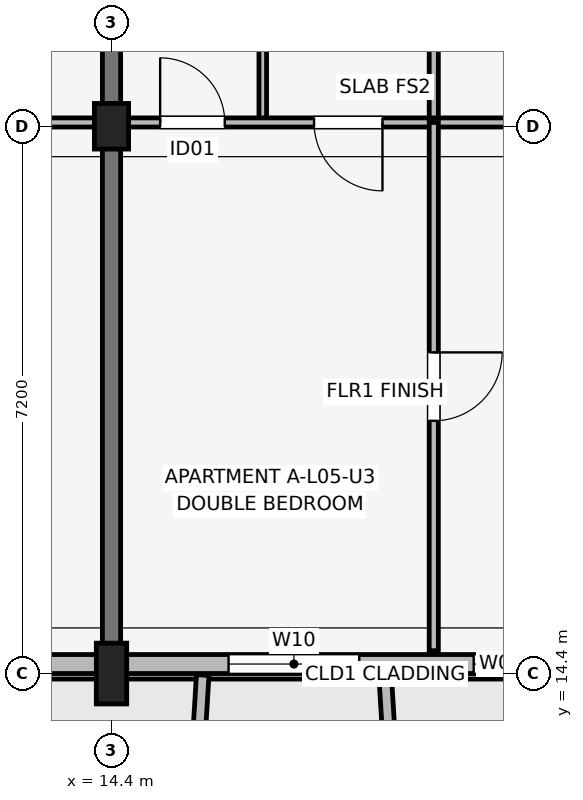
"""IFC4 building model, lengths in metres.
Left out: names, types, materials, properties, quantities, classifications, styles, units other than length and angle.
Written with IfcOpenShell. Run it as: python <this file> out.ifc"""

import sys

from ifc_helpers import new_model, si_unit, direction, frame, frame_2d, origin, origin_2d, place, context, subcontext, project, spatial, rectangle, extrude, element, fill, save


model = new_model("IFC4")
c1 = context("Model", 3, precision=1e-05, world=origin(), true_north=direction((0.0, 1.0)))
c2 = subcontext(c1, "Body", "Model", "MODEL_VIEW")
j1 = project(units=[si_unit("LENGTHUNIT", "METRE"), si_unit("PLANEANGLEUNIT", "RADIAN")], contexts=[c1])
p1 = place(None, origin())
s1 = spatial("IfcSite", under=j1, at=p1, CompositionType="ELEMENT")
p2 = place(p1, origin())
s2 = spatial("IfcBuilding", under=s1, at=p2, CompositionType="ELEMENT")
p3 = place(p2, frame((0.0, 0.0, 18.15)))
s3 = spatial("IfcBuildingStorey", under=s2, at=p3, CompositionType="ELEMENT", Elevation=18.15)
p4 = place(p3, frame((14.4, 14.4, 0.0), z_axis=(0.0, 0.0, 1.0), x_axis=(1.0, 0.0, 0.0)))
e1 = element("IfcColumn", 1, at=p4, inside=s3, PredefinedType="COLUMN", context=c2, shape_type="SweptSolid", body=[
    extrude(rectangle(XDim=0.4, YDim=0.8, at=origin_2d()), origin(), (0.0, 0.0, 1.0), 3.15),
])
p5 = place(p3, frame((14.4, 21.6, 0.0), z_axis=(0.0, 0.0, 1.0), x_axis=(1.0, 0.0, 0.0)))
e2 = element("IfcColumn", 2, at=p5, inside=s3, PredefinedType="COLUMN", context=c2, shape_type="SweptSolid", body=[
    extrude(rectangle(XDim=0.45, YDim=0.6, at=origin_2d()), origin(), (0.0, 0.0, 1.0), 3.15),
])
p6 = place(p3, frame((14.4, 14.75, 0.0), z_axis=(0.0, 0.0, 1.0), x_axis=(0.0, 1.0, 0.0)))
e3 = element("IfcWall", 3, at=p6, inside=s3, PredefinedType="SHEAR", context=c2, shape_type="SweptSolid", body=[
    extrude(rectangle(XDim=9.4, YDim=0.24, at=frame_2d((4.7, 0.0))), origin(), (0.0, 0.0, 1.0), 3.15),
])
p7 = place(p3, frame((3.4, 14.525, 0.0), z_axis=(0.0, 0.0, 1.0), x_axis=(1.0, 0.0, 0.0)))
e4 = element("IfcWall", 4, at=p7, inside=s3, PredefinedType="SOLIDWALL", context=c2, shape_type="SweptSolid", body=[
    extrude(rectangle(XDim=29.2, YDim=0.25, at=frame_2d((14.6, 0.0))), origin(), (0.0, 0.0, 1.0), 2.43),
])
p8 = place(p7, frame((9.425, 0.0, 0.0), z_axis=(0.0, 0.0, 1.0), x_axis=(-1.0, 0.0, 0.0)))
e5 = element("IfcOpeningElement", 5, at=p8, cuts=e4, PredefinedType="OPENING", context=c2, shape_type="SweptSolid", body=[
    extrude(rectangle(XDim=1.65, YDim=2.15, at=frame_2d((0.825, 1.075))), frame((0.0, 0.135, 0.0), z_axis=(0.0, -1.0, 0.0), x_axis=(1.0, 0.0, 0.0)), (0.0, 0.0, 1.0), 0.27),
])
p9 = place(p7, frame((23.75, 0.0, 0.0), z_axis=(0.0, 0.0, 1.0), x_axis=(-1.0, 0.0, 0.0)))
e6 = element("IfcOpeningElement", 6, at=p9, cuts=e4, PredefinedType="OPENING", context=c2, shape_type="SweptSolid", body=[
    extrude(rectangle(XDim=1.5, YDim=2.15, at=frame_2d((0.75, 1.075))), frame((0.0, 0.135, 0.0), z_axis=(0.0, -1.0, 0.0), x_axis=(1.0, 0.0, 0.0)), (0.0, 0.0, 1.0), 0.27),
])
p10 = place(p7, frame((0.61, 0.0, 0.7)))
e7 = element("IfcOpeningElement", 7, at=p10, cuts=e4, PredefinedType="OPENING", context=c2, shape_type="SweptSolid", body=[
    extrude(rectangle(XDim=1.58, YDim=1.6, at=frame_2d((0.79, 0.8))), frame((0.0, 0.135, 0.0), z_axis=(0.0, -1.0, 0.0), x_axis=(1.0, 0.0, 0.0)), (0.0, 0.0, 1.0), 0.27),
])
p11 = place(p7, frame((12.54, 0.0, 0.7)))
e8 = element("IfcOpeningElement", 8, at=p11, cuts=e4, PredefinedType="OPENING", context=c2, shape_type="SweptSolid", body=[
    extrude(rectangle(XDim=1.72, YDim=1.6, at=frame_2d((0.86, 0.8))), frame((0.0, 0.135, 0.0), z_axis=(0.0, -1.0, 0.0), x_axis=(1.0, 0.0, 0.0)), (0.0, 0.0, 1.0), 0.27),
])
p12 = place(p7, frame((15.765, 0.0, 0.75)))
e9 = element("IfcOpeningElement", 9, at=p12, cuts=e4, PredefinedType="OPENING", context=c2, shape_type="SweptSolid", body=[
    extrude(rectangle(XDim=0.72, YDim=1.35, at=frame_2d((0.36, 0.675))), frame((0.0, 0.135, 0.0), z_axis=(0.0, -1.0, 0.0), x_axis=(1.0, 0.0, 0.0)), (0.0, 0.0, 1.0), 0.27),
])
p13 = place(p7, frame((18.56, 0.0, 0.75)))
e10 = element("IfcOpeningElement", 10, at=p13, cuts=e4, PredefinedType="OPENING", context=c2, shape_type="SweptSolid", body=[
    extrude(rectangle(XDim=0.72, YDim=1.35, at=frame_2d((0.36, 0.675))), frame((0.0, 0.135, 0.0), z_axis=(0.0, -1.0, 0.0), x_axis=(1.0, 0.0, 0.0)), (0.0, 0.0, 1.0), 0.27),
])
p14 = place(p7, frame((25.76, 0.0, 0.75)))
e11 = element("IfcOpeningElement", 11, at=p14, cuts=e4, PredefinedType="OPENING", context=c2, shape_type="SweptSolid", body=[
    extrude(rectangle(XDim=0.72, YDim=1.35, at=frame_2d((0.36, 0.675))), frame((0.0, 0.135, 0.0), z_axis=(0.0, -1.0, 0.0), x_axis=(1.0, 0.0, 0.0)), (0.0, 0.0, 1.0), 0.27),
])
p15 = place(p7, frame((27.65, 0.0, 0.75)))
e12 = element("IfcOpeningElement", 12, at=p15, cuts=e4, PredefinedType="OPENING", context=c2, shape_type="SweptSolid", body=[
    extrude(rectangle(XDim=1.1, YDim=1.5, at=frame_2d((0.55, 0.75))), frame((0.0, 0.135, 0.0), z_axis=(0.0, -1.0, 0.0), x_axis=(1.0, 0.0, 0.0)), (0.0, 0.0, 1.0), 0.27),
])
for number, where, z_axis, x_axis in (
    (13, (15.6, 14.38, 0.0), (0.0, 0.0, 1.0), (-0.061, -0.998, 0.0)),
    (14, (18.0, 14.38, 0.0), (0.0, 0.0, 1.0), (0.061, -0.998, 0.0)),
):
    element("IfcWall", number, at=place(p3, frame(where, z_axis=z_axis, x_axis=x_axis)), inside=s3, PredefinedType="ELEMENTEDWALL", context=c2, shape_type="SweptSolid", body=[
        extrude(rectangle(XDim=1.964, YDim=0.165, at=frame_2d((0.982, 0.0))), origin(), (0.0, 0.0, 1.0), 2.48),
    ])
p16 = place(p3, frame((7.34, 21.65, 0.0), z_axis=(0.0, 0.0, 1.0), x_axis=(1.0, 0.0, 0.0)))
e15 = element("IfcWall", 15, at=p16, inside=s3, PredefinedType="PARTITIONING", context=c2, shape_type="SweptSolid", body=[
    extrude(rectangle(XDim=6.92, YDim=0.12, at=frame_2d((3.46, 0.0))), origin(), (0.0, 0.0, 1.0), 2.375),
])
p17 = place(p16, frame((0.5, 0.0, 0.0)))
e16 = element("IfcOpeningElement", 16, at=p17, cuts=e15, PredefinedType="OPENING", context=c2, shape_type="SweptSolid", body=[
    extrude(rectangle(XDim=0.85, YDim=2.08, at=frame_2d((0.425, 1.04))), frame((0.0, 0.07, 0.0), z_axis=(0.0, -1.0, 0.0), x_axis=(1.0, 0.0, 0.0)), (0.0, 0.0, 1.0), 0.14),
])
p18 = place(p16, frame((3.275, 0.0, 0.0), z_axis=(0.0, 0.0, 1.0), x_axis=(-1.0, 0.0, 0.0)))
e17 = element("IfcOpeningElement", 17, at=p18, cuts=e15, PredefinedType="OPENING", context=c2, shape_type="SweptSolid", body=[
    extrude(rectangle(XDim=0.9, YDim=2.08, at=frame_2d((0.45, 1.04))), frame((0.0, 0.07, 0.0), z_axis=(0.0, -1.0, 0.0), x_axis=(1.0, 0.0, 0.0)), (0.0, 0.0, 1.0), 0.14),
])
p19 = place(p16, frame((4.885, 0.0, 0.0)))
e18 = element("IfcOpeningElement", 18, at=p19, cuts=e15, PredefinedType="OPENING", context=c2, shape_type="SweptSolid", body=[
    extrude(rectangle(XDim=0.95, YDim=2.08, at=frame_2d((0.475, 1.04))), frame((0.0, 0.07, 0.0), z_axis=(0.0, -1.0, 0.0), x_axis=(1.0, 0.0, 0.0)), (0.0, 0.0, 1.0), 0.14),
])
p20 = place(p3, frame((16.39, 21.65, 0.0), z_axis=(0.0, 0.0, 1.0), x_axis=(0.0, 1.0, 0.0)))
e19 = element("IfcWall", 19, at=p20, inside=s3, PredefinedType="PARTITIONING", context=c2, shape_type="SweptSolid", body=[
    extrude(rectangle(XDim=2.65, YDim=0.1, at=frame_2d((1.325, 0.0))), origin(), (0.0, 0.0, 1.0), 2.375),
])
p21 = place(p3, frame((18.64, 21.65, 0.0), z_axis=(0.0, 0.0, 1.0), x_axis=(0.0, 1.0, 0.0)))
e20 = element("IfcWall", 20, at=p21, inside=s3, PredefinedType="PARTITIONING", context=c2, shape_type="SweptSolid", body=[
    extrude(rectangle(XDim=2.65, YDim=0.12, at=frame_2d((1.325, 0.0))), origin(), (0.0, 0.0, 1.0), 2.375),
])
p22 = place(p3, frame((14.54, 21.65, 0.0), z_axis=(0.0, 0.0, 1.0), x_axis=(1.0, 0.0, 0.0)))
e21 = element("IfcWall", 21, at=p22, inside=s3, PredefinedType="PARTITIONING", context=c2, shape_type="SweptSolid", body=[
    extrude(rectangle(XDim=6.92, YDim=0.12, at=frame_2d((3.46, 0.0))), origin(), (0.0, 0.0, 1.0), 2.375),
])
p23 = place(p22, frame((0.5, 0.0, 0.0)))
e22 = element("IfcOpeningElement", 22, at=p23, cuts=e21, PredefinedType="OPENING", context=c2, shape_type="SweptSolid", body=[
    extrude(rectangle(XDim=0.85, YDim=2.08, at=frame_2d((0.425, 1.04))), frame((0.0, 0.07, 0.0), z_axis=(0.0, -1.0, 0.0), x_axis=(1.0, 0.0, 0.0)), (0.0, 0.0, 1.0), 0.14),
])
p24 = place(p22, frame((3.425, 0.0, 0.0), z_axis=(0.0, 0.0, 1.0), x_axis=(-1.0, 0.0, 0.0)))
e23 = element("IfcOpeningElement", 23, at=p24, cuts=e21, PredefinedType="OPENING", context=c2, shape_type="SweptSolid", body=[
    extrude(rectangle(XDim=0.9, YDim=2.08, at=frame_2d((0.45, 1.04))), frame((0.0, 0.07, 0.0), z_axis=(0.0, -1.0, 0.0), x_axis=(1.0, 0.0, 0.0)), (0.0, 0.0, 1.0), 0.14),
])
p25 = place(p22, frame((5.035, 0.0, 0.0)))
e24 = element("IfcOpeningElement", 24, at=p25, cuts=e21, PredefinedType="OPENING", context=c2, shape_type="SweptSolid", body=[
    extrude(rectangle(XDim=0.95, YDim=2.08, at=frame_2d((0.475, 1.04))), frame((0.0, 0.07, 0.0), z_axis=(0.0, -1.0, 0.0), x_axis=(1.0, 0.0, 0.0)), (0.0, 0.0, 1.0), 0.14),
])
p26 = place(p3, frame((18.64, 14.7, 0.0), z_axis=(0.0, 0.0, 1.0), x_axis=(0.0, 1.0, 0.0)))
e25 = element("IfcWall", 25, at=p26, inside=s3, PredefinedType="PARTITIONING", context=c2, shape_type="SweptSolid", body=[
    extrude(rectangle(XDim=6.95, YDim=0.12, at=frame_2d((3.475, 0.0))), origin(), (0.0, 0.0, 1.0), 2.375),
])
p27 = place(p26, frame((3.925, 0.0, 0.0), z_axis=(0.0, 0.0, 1.0), x_axis=(-1.0, 0.0, 0.0)))
e26 = element("IfcOpeningElement", 26, at=p27, cuts=e25, PredefinedType="OPENING", context=c2, shape_type="SweptSolid", body=[
    extrude(rectangle(XDim=0.9, YDim=2.08, at=frame_2d((0.45, 1.04))), frame((0.0, 0.07, 0.0), z_axis=(0.0, -1.0, 0.0), x_axis=(1.0, 0.0, 0.0)), (0.0, 0.0, 1.0), 0.14),
])
p28 = place(p11, origin())
e27 = element("IfcWindow", 27, at=p28, inside=s3, PartitioningType="SINGLE_PANEL", PredefinedType="WINDOW", context=c2, shape_type="SweptSolid", body=[
    extrude(rectangle(XDim=1.72, YDim=1.6, at=frame_2d((0.86, 0.8))), frame((0.0, 0.03, 0.0), z_axis=(0.0, -1.0, 0.0), x_axis=(1.0, 0.0, 0.0)), (0.0, 0.0, 1.0), 0.06),
])
fill(e8, e27)
p29 = place(p12, origin())
e28 = element("IfcWindow", 28, at=p29, inside=s3, PartitioningType="SINGLE_PANEL", PredefinedType="WINDOW", context=c2, shape_type="SweptSolid", body=[
    extrude(rectangle(XDim=0.72, YDim=1.35, at=frame_2d((0.36, 0.675))), frame((0.0, 0.03, 0.0), z_axis=(0.0, -1.0, 0.0), x_axis=(1.0, 0.0, 0.0)), (0.0, 0.0, 1.0), 0.06),
])
fill(e9, e28)
p30 = place(p23, origin())
e29 = element("IfcDoor", 29, at=p30, inside=s3, OperationType="SINGLE_SWING_LEFT", PredefinedType="DOOR", context=c2, shape_type="SweptSolid", body=[
    extrude(rectangle(XDim=0.85, YDim=2.08, at=frame_2d((0.425, 1.04))), frame((0.0, 0.025, 0.0), z_axis=(0.0, -1.0, 0.0), x_axis=(1.0, 0.0, 0.0)), (0.0, 0.0, 1.0), 0.05),
])
fill(e22, e29)
p31 = place(p24, origin())
e30 = element("IfcDoor", 30, at=p31, inside=s3, OperationType="SINGLE_SWING_RIGHT", PredefinedType="DOOR", context=c2, shape_type="SweptSolid", body=[
    extrude(rectangle(XDim=0.9, YDim=2.08, at=frame_2d((0.45, 1.04))), frame((0.0, 0.025, 0.0), z_axis=(0.0, -1.0, 0.0), x_axis=(1.0, 0.0, 0.0)), (0.0, 0.0, 1.0), 0.05),
])
fill(e23, e30)
p32 = place(p27, origin())
e31 = element("IfcDoor", 31, at=p32, inside=s3, OperationType="SINGLE_SWING_RIGHT", PredefinedType="DOOR", context=c2, shape_type="SweptSolid", body=[
    extrude(rectangle(XDim=0.9, YDim=2.08, at=frame_2d((0.45, 1.04))), frame((0.0, 0.025, 0.0), z_axis=(0.0, -1.0, 0.0), x_axis=(1.0, 0.0, 0.0)), (0.0, 0.0, 1.0), 0.05),
])
fill(e26, e31)
save(model, sys.argv[1])
